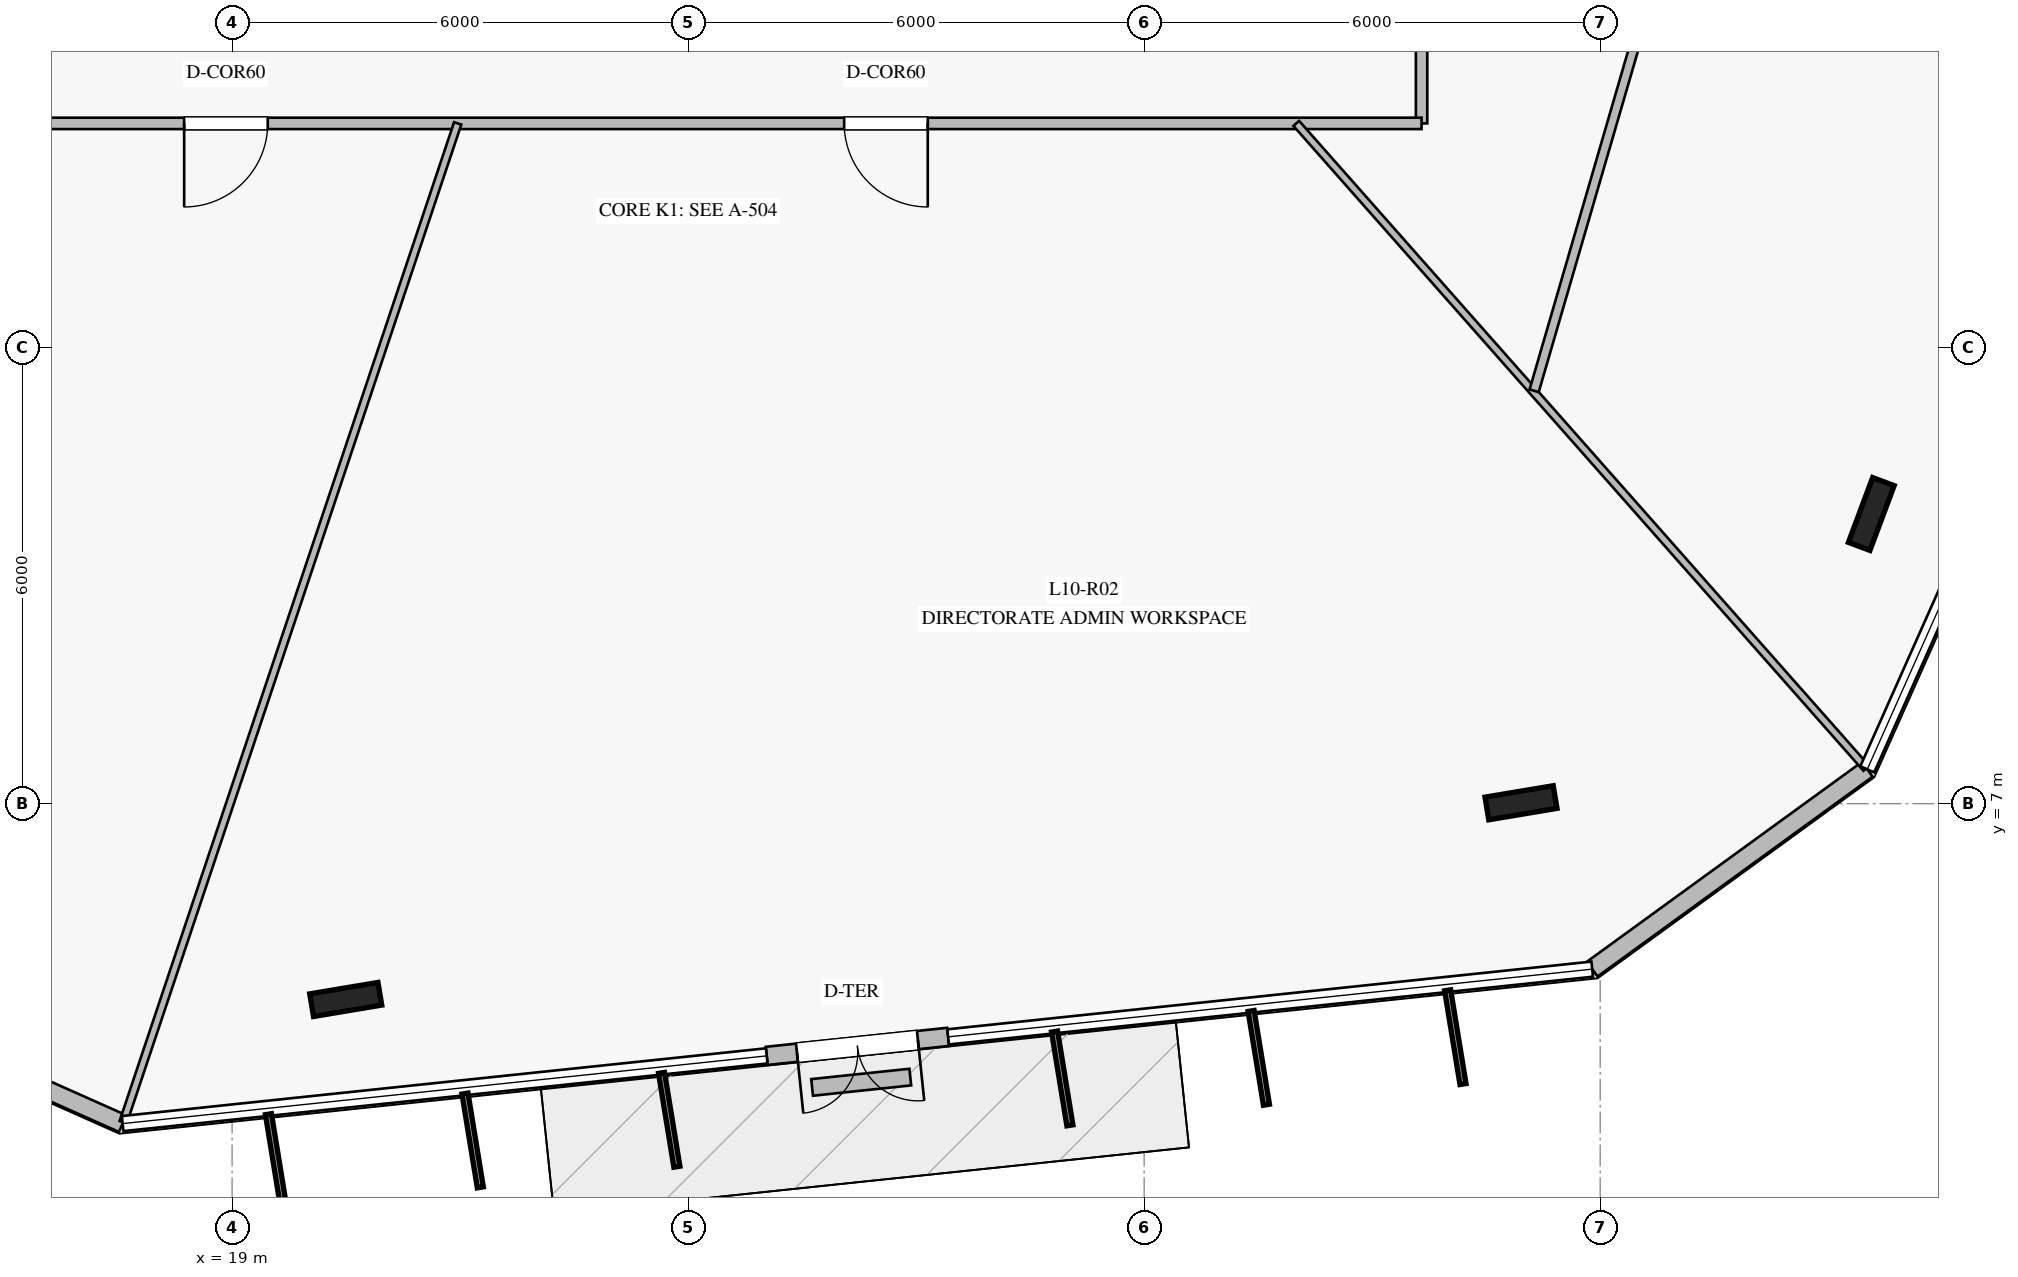
"""IFC4 building model, lengths in metres.
Left out: names, types, materials, properties, quantities, classifications, styles, units other than length and angle.
Written with IfcOpenShell. Run it as: python <this file> out.ifc"""

import sys

from ifc_helpers import new_model, si_unit, direction, frame, frame_2d, origin, origin_2d, place, context, subcontext, project, spatial, rectangle, i_section, extrude, element, fill, save


model = new_model("IFC4")
c1 = context("Model", 3, precision=1e-05, world=origin(), true_north=direction((0.0, 1.0)))
c2 = subcontext(c1, "Body", "Model", "MODEL_VIEW")
j1 = project(units=[si_unit("LENGTHUNIT", "METRE"), si_unit("PLANEANGLEUNIT", "RADIAN")], contexts=[c1])
p1 = place(None, origin())
s1 = spatial("IfcSite", under=j1, at=p1, CompositionType="ELEMENT")
p2 = place(p1, origin())
s2 = spatial("IfcBuilding", under=s1, at=p2, CompositionType="ELEMENT")
p3 = place(p2, frame((0.0, 0.0, 44.0)))
s3 = spatial("IfcBuildingStorey", under=s2, at=p3, CompositionType="ELEMENT", Elevation=44.0)
for number, where, z_axis, x_axis in (
    (1, (20.495, 4.424, 0.0), (0.0, 0.0, 1.0), (0.986, 0.165, 0.0)),
    (2, (35.958, 7.012, 0.0), (0.0, 0.0, 1.0), (0.986, 0.165, 0.0)),
    (3, (40.567, 10.811, 0.0), (0.0, 0.0, 1.0), (0.35, 0.937, 0.0)),
):
    element("IfcColumn", number, at=place(p3, frame(where, z_axis=z_axis, x_axis=x_axis)), inside=s3, PredefinedType="COLUMN", context=c2, shape_type="SweptSolid", body=[
        extrude(i_section(OverallWidth=0.302, OverallDepth=0.91, WebThickness=0.021, FlangeThickness=0.04, at=origin_2d()), origin(), (0.0, 0.0, 1.0), 4.0),
    ])
p4 = place(p3, frame((13.474, 4.61, 0.0), z_axis=(0.0, 0.0, 1.0), x_axis=(0.91355250122, -0.406720822573, 0.0)))
e4 = element("IfcWall", 4, at=p4, inside=s3, PredefinedType="STANDARD", context=c2, shape_type="SweptSolid", body=[
    extrude(rectangle(XDim=4.473, YDim=0.24, at=frame_2d((2.236, 0.0))), origin(), (0.0, 0.0, 1.0), 3.76),
])
p5 = place(p3, frame((26.034, 3.682, 0.0), z_axis=(0.0, 0.0, 1.0), x_axis=(0.994559942167, 0.104165836226, 0.0)))
e5 = element("IfcWall", 5, at=p5, inside=s3, PredefinedType="STANDARD", context=c2, shape_type="SweptSolid", body=[
    extrude(rectangle(XDim=2.4, YDim=0.24, at=frame_2d((1.2, 0.0))), origin(), (0.0, 0.0, 1.0), 3.76),
])
p6 = place(p5, frame((0.4, 0.0, 0.0)))
e6 = element("IfcOpeningElement", 6, at=p6, cuts=e5, PredefinedType="OPENING", context=c2, shape_type="SweptSolid", body=[
    extrude(rectangle(XDim=1.6, YDim=2.25, at=frame_2d((0.8, 1.125))), frame((0.0, 0.13, 0.0), z_axis=(0.0, -1.0, 0.0), x_axis=(1.0, 0.0, 0.0)), (0.0, 0.0, 1.0), 0.26),
])
p7 = place(p3, frame((36.895, 4.823, 0.0), z_axis=(0.0, 0.0, 1.0), x_axis=(0.80905696026, 0.587730240038, 0.0)))
e7 = element("IfcWall", 7, at=p7, inside=s3, PredefinedType="STANDARD", context=c2, shape_type="SweptSolid", body=[
    extrude(rectangle(XDim=4.473, YDim=0.24, at=frame_2d((2.236, 0.0))), origin(), (0.0, 0.0, 1.0), 3.76),
])
p8 = place(p3, frame((26.631, 3.267, 0.0), z_axis=(0.0, 0.0, 1.0), x_axis=(0.994506482607, 0.104675002043, 0.0)))
e8 = element("IfcWall", 8, at=p8, inside=s3, PredefinedType="USERDEFINED", context=c2, shape_type="SweptSolid", body=[
    extrude(rectangle(XDim=1.299, YDim=0.22, at=frame_2d((0.649, 0.0))), origin(), (0.0, 0.0, 1.0), 0.4),
])
p9 = place(p3, frame((34.65, 34.05, 0.0), z_axis=(0.0, 0.0, 1.0), x_axis=(0.0, -1.0, 0.0)))
e9 = element("IfcWall", 9, at=p9, inside=s3, PredefinedType="PARTITIONING", context=c2, shape_type="SweptSolid", body=[
    extrude(rectangle(XDim=18.1, YDim=0.15, at=frame_2d((9.05, 0.0))), origin(), (0.0, 0.0, 1.0), 3.21),
])
p10 = place(p9, frame((12.708, 0.0, 0.0)))
e10 = element("IfcOpeningElement", 10, at=p10, cuts=e9, PredefinedType="OPENING", context=c2, shape_type="SweptSolid", body=[
    extrude(rectangle(XDim=1.1, YDim=2.2, at=frame_2d((0.55, 1.1))), frame((0.0, 0.085, 0.0), z_axis=(0.0, -1.0, 0.0), x_axis=(1.0, 0.0, 0.0)), (0.0, 0.0, 1.0), 0.17),
])
p11 = place(p9, frame((4.114, 0.0, 0.0)))
e11 = element("IfcOpeningElement", 11, at=p11, cuts=e9, PredefinedType="OPENING", context=c2, shape_type="SweptSolid", body=[
    extrude(rectangle(XDim=1.1, YDim=2.2, at=frame_2d((0.55, 1.1))), frame((0.0, 0.085, 0.0), z_axis=(0.0, -1.0, 0.0), x_axis=(1.0, 0.0, 0.0)), (0.0, 0.0, 1.0), 0.17),
])
p12 = place(p3, frame((34.65, 15.95, 0.0), z_axis=(0.0, 0.0, 1.0), x_axis=(-1.0, 0.0, 0.0)))
e12 = element("IfcWall", 12, at=p12, inside=s3, PredefinedType="PARTITIONING", context=c2, shape_type="SweptSolid", body=[
    extrude(rectangle(XDim=19.3, YDim=0.15, at=frame_2d((9.65, 0.0))), origin(), (0.0, 0.0, 1.0), 3.21),
])
p13 = place(p12, frame((15.181, 0.0, 0.0)))
e13 = element("IfcOpeningElement", 13, at=p13, cuts=e12, PredefinedType="OPENING", context=c2, shape_type="SweptSolid", body=[
    extrude(rectangle(XDim=1.1, YDim=2.2, at=frame_2d((0.55, 1.1))), frame((0.0, 0.085, 0.0), z_axis=(0.0, -1.0, 0.0), x_axis=(1.0, 0.0, 0.0)), (0.0, 0.0, 1.0), 0.17),
])
p14 = place(p12, frame((6.497, 0.0, 0.0)))
e14 = element("IfcOpeningElement", 14, at=p14, cuts=e12, PredefinedType="OPENING", context=c2, shape_type="SweptSolid", body=[
    extrude(rectangle(XDim=1.1, YDim=2.2, at=frame_2d((0.55, 1.1))), frame((0.0, 0.085, 0.0), z_axis=(0.0, -1.0, 0.0), x_axis=(1.0, 0.0, 0.0)), (0.0, 0.0, 1.0), 0.17),
])
p15 = place(p3, frame((21.968, 15.95, 0.0), z_axis=(0.0, 0.0, 1.0), x_axis=(-0.317580424763, -0.948231339815, 0.0)))
e15 = element("IfcWall", 15, at=p15, inside=s3, PredefinedType="MOVABLE", context=c2, shape_type="SweptSolid", body=[
    extrude(rectangle(XDim=13.858, YDim=0.1, at=frame_2d((6.929, 0.0))), origin(), (0.0, 0.0, 1.0), 3.05),
])
p16 = place(p3, frame((33.001, 15.95, 0.0), z_axis=(0.0, 0.0, 1.0), x_axis=(0.662327291421, -0.749214628153, 0.0)))
e16 = element("IfcWall", 16, at=p16, inside=s3, PredefinedType="MOVABLE", context=c2, shape_type="SweptSolid", body=[
    extrude(rectangle(XDim=11.324, YDim=0.1, at=frame_2d((5.662, 0.0))), origin(), (0.0, 0.0, 1.0), 3.06),
])
p17 = place(p3, frame((36.131, 12.432, 0.0), z_axis=(0.0, 0.0, 1.0), x_axis=(0.279451559727, 0.960159791788, 0.0)))
e17 = element("IfcWall", 17, at=p17, inside=s3, PredefinedType="PARTITIONING", context=c2, shape_type="SweptSolid", body=[
    extrude(rectangle(XDim=13.215, YDim=0.125, at=frame_2d((6.607, 0.0))), origin(), (0.0, 0.0, 1.0), 3.21),
])
p18 = place(p17, frame((6.018, 0.0, 0.0)))
e18 = element("IfcOpeningElement", 18, at=p18, cuts=e17, PredefinedType="OPENING", context=c2, shape_type="SweptSolid", body=[
    extrude(rectangle(XDim=1.0, YDim=2.15, at=frame_2d((0.5, 1.075))), frame((0.0, 0.073, 0.0), z_axis=(0.0, -1.0, 0.0), x_axis=(1.0, 0.0, 0.0)), (0.0, 0.0, 1.0), 0.145),
])
p19 = place(p6, frame((1.6, 0.0, 0.0), z_axis=(0.0, 0.0, 1.0), x_axis=(-1.0, 0.0, 0.0)))
e19 = element("IfcDoor", 19, at=p19, inside=s3, OperationType="DOUBLE_DOOR_SINGLE_SWING", PredefinedType="DOOR", context=c2, shape_type="SweptSolid", body=[
    extrude(rectangle(XDim=1.6, YDim=2.25, at=frame_2d((0.8, 1.125))), frame((0.0, 0.025, 0.0), z_axis=(0.0, -1.0, 0.0), x_axis=(1.0, 0.0, 0.0)), (0.0, 0.0, 1.0), 0.05),
])
fill(e6, e19)
p20 = place(p13, origin())
e20 = element("IfcDoor", 20, at=p20, inside=s3, OperationType="SINGLE_SWING_RIGHT", PredefinedType="DOOR", context=c2, shape_type="SweptSolid", body=[
    extrude(rectangle(XDim=1.1, YDim=2.2, at=frame_2d((0.55, 1.1))), frame((0.0, 0.025, 0.0), z_axis=(0.0, -1.0, 0.0), x_axis=(1.0, 0.0, 0.0)), (0.0, 0.0, 1.0), 0.05),
])
fill(e13, e20)
p21 = place(p14, origin())
e21 = element("IfcDoor", 21, at=p21, inside=s3, OperationType="SINGLE_SWING_LEFT", PredefinedType="DOOR", context=c2, shape_type="SweptSolid", body=[
    extrude(rectangle(XDim=1.1, YDim=2.2, at=frame_2d((0.55, 1.1))), frame((0.0, 0.025, 0.0), z_axis=(0.0, -1.0, 0.0), x_axis=(1.0, 0.0, 0.0)), (0.0, 0.0, 1.0), 0.05),
])
fill(e14, e21)
save(model, sys.argv[1])
